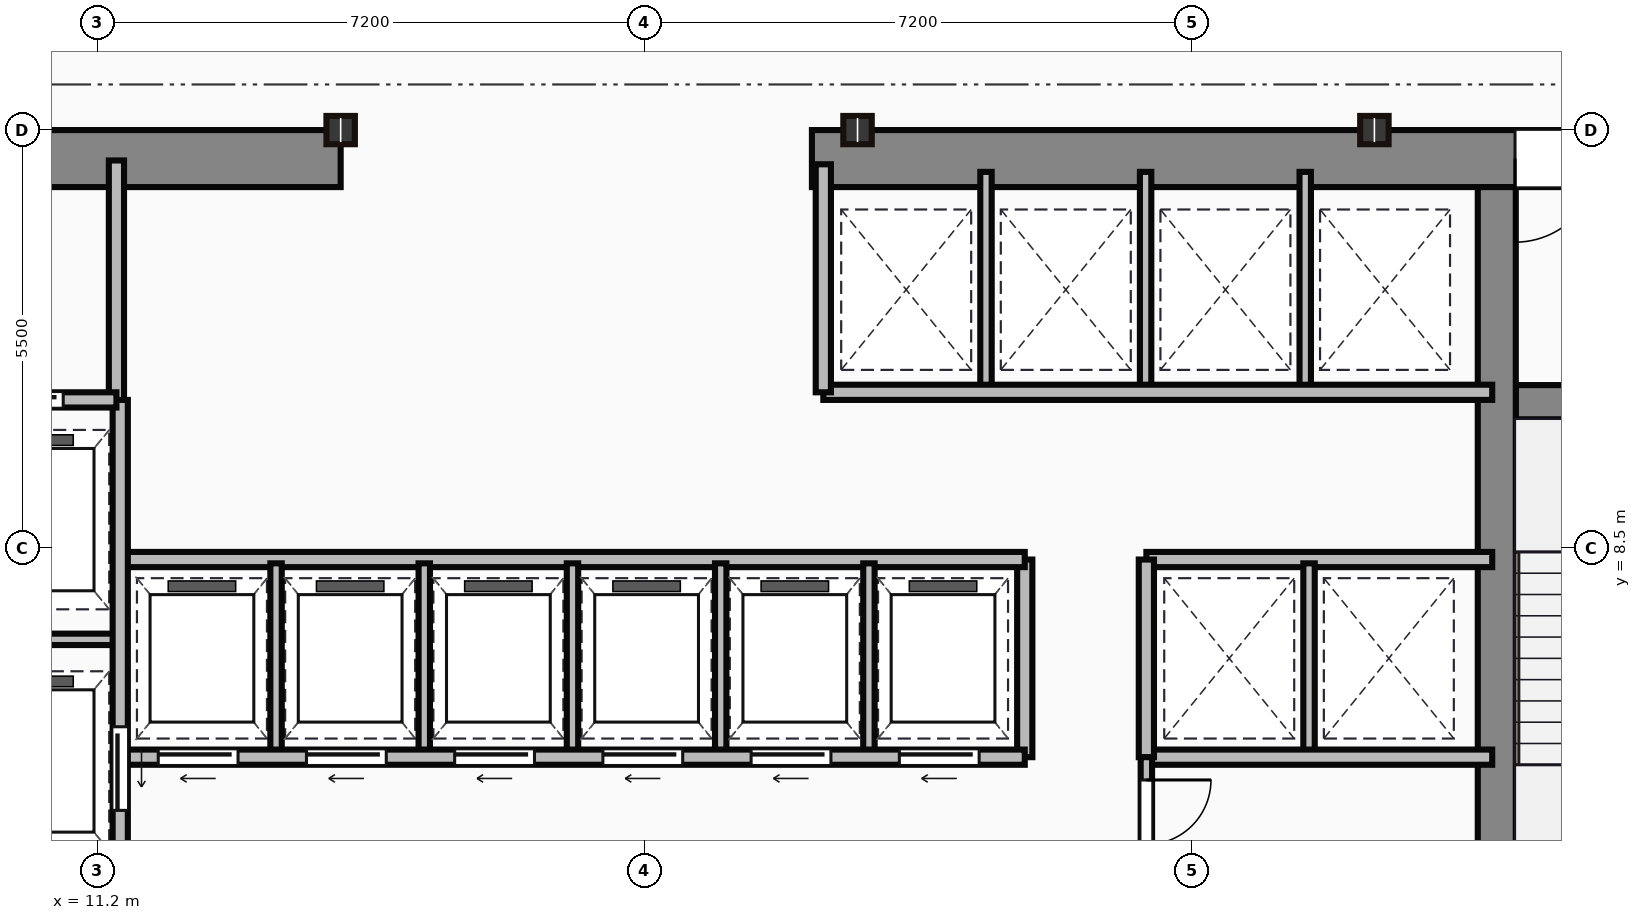
"""IFC4 building model, lengths in metres.
Left out: names, types, materials, properties, quantities, classifications, styles, units other than length and angle.
Written with IfcOpenShell. Run it as: python <this file> out.ifc"""

import sys

from ifc_helpers import new_model, si_unit, direction, frame, frame_2d, origin, origin_2d, place, context, subcontext, project, spatial, rectangle, i_section, extrude, source, transform, mapped, element, fill, save


model = new_model("IFC4")
c1 = context("Model", 3, precision=1e-05, world=origin(), true_north=direction((0.0, 1.0)))
c2 = subcontext(c1, "Body", "Model", "MODEL_VIEW")
j1 = project(units=[si_unit("LENGTHUNIT", "METRE"), si_unit("PLANEANGLEUNIT", "RADIAN")], contexts=[c1])
p1 = place(None, origin())
s1 = spatial("IfcSite", under=j1, at=p1, CompositionType="ELEMENT")
p2 = place(p1, origin())
s2 = spatial("IfcBuilding", under=s1, at=p2, CompositionType="ELEMENT")
p3 = place(p2, frame((0.0, 0.0, 140.6)))
s3 = spatial("IfcBuildingStorey", under=s2, at=p3, CompositionType="ELEMENT", Elevation=140.6)
m1 = source(origin(), c2, "Body", "SweptSolid", [
    extrude(rectangle(XDim=9.1, YDim=0.75, at=frame_2d((4.55, 0.0))), origin(), (0.0, 0.0, 1.0), 3.65),
])
p4 = place(p3, frame((5.3, 13.625, 0.0), z_axis=(0.0, 0.0, 1.0), x_axis=(1.0, 0.0, 0.0)))
e1 = element("IfcWall", 1, at=p4, inside=s3, PredefinedType="SHEAR", context=c2, shape_type="MappedRepresentation", body=[
    mapped(m1, transform((0.0, 0.0, 0.0))),
])
p5 = place(p4, frame((4.1, 0.0, 0.0)))
e2 = element("IfcOpeningElement", 2, at=p5, cuts=e1, PredefinedType="OPENING", context=c2, shape_type="SweptSolid", body=[
    extrude(rectangle(XDim=1.1, YDim=2.15, at=frame_2d((0.55, 1.075))), frame((0.0, 0.385, 0.0), z_axis=(0.0, -1.0, 0.0), x_axis=(1.0, 0.0, 0.0)), (0.0, 0.0, 1.0), 0.77),
])
m2 = source(origin(), c2, "Body", "SweptSolid", [
    extrude(rectangle(XDim=12.6, YDim=0.75, at=frame_2d((6.3, 0.0))), origin(), (0.0, 0.0, 1.0), 3.65),
])
p6 = place(p3, frame((20.6, 13.625, 0.0), z_axis=(0.0, 0.0, 1.0), x_axis=(1.0, 0.0, 0.0)))
e3 = element("IfcWall", 3, at=p6, inside=s3, PredefinedType="SHEAR", context=c2, shape_type="MappedRepresentation", body=[
    mapped(m2, transform((0.0, 0.0, 0.0))),
])
p7 = place(p6, frame((9.25, 0.0, 0.0)))
e4 = element("IfcOpeningElement", 4, at=p7, cuts=e3, PredefinedType="OPENING", context=c2, shape_type="SweptSolid", body=[
    extrude(rectangle(XDim=1.1, YDim=2.15, at=frame_2d((0.55, 1.075))), frame((0.0, 0.385, 0.0), z_axis=(0.0, -1.0, 0.0), x_axis=(1.0, 0.0, 0.0)), (0.0, 0.0, 1.0), 0.77),
])
m3 = source(origin(), c2, "Body", "SweptSolid", [
    extrude(rectangle(XDim=12.35, YDim=0.5, at=frame_2d((6.175, 0.0))), origin(), (0.0, 0.0, 1.0), 3.65),
])
p8 = place(p3, frame((29.61, 0.9, 0.0), z_axis=(0.0, 0.0, 1.0), x_axis=(0.0, 1.0, 0.0)))
e5 = element("IfcWall", 5, at=p8, inside=s3, PredefinedType="SHEAR", context=c2, shape_type="MappedRepresentation", body=[
    mapped(m3, transform((0.0, 0.0, 0.0))),
])
m4 = source(origin(), c2, "Body", "SweptSolid", [
    extrude(rectangle(XDim=3.39, YDim=0.45, at=frame_2d((1.695, 0.0))), origin(), (0.0, 0.0, 1.0), 3.65),
])
p9 = place(p3, frame((29.86, 10.42, 0.0), z_axis=(0.0, 0.0, 1.0), x_axis=(1.0, 0.0, 0.0)))
e6 = element("IfcWall", 6, at=p9, inside=s3, PredefinedType="SHEAR", context=c2, shape_type="MappedRepresentation", body=[
    mapped(m4, transform((0.0, 0.0, 0.0))),
])
p10 = place(p9, frame((1.1, 0.0, 0.0)))
e7 = element("IfcOpeningElement", 7, at=p10, cuts=e6, PredefinedType="OPENING", context=c2, shape_type="SweptSolid", body=[
    extrude(rectangle(XDim=1.1, YDim=2.15, at=frame_2d((0.55, 1.075))), frame((0.0, 0.235, 0.0), z_axis=(0.0, -1.0, 0.0), x_axis=(1.0, 0.0, 0.0)), (0.0, 0.0, 1.0), 0.47),
])
m5 = source(origin(), c2, "Body", "SweptSolid", [
    extrude(i_section(OverallWidth=0.374, OverallDepth=0.372, WebThickness=0.016, FlangeThickness=0.026, at=origin_2d()), origin(), (0.0, 0.0, 1.0), 3.65),
])
for number, where, z_axis, x_axis in (
    (8, (14.4, 14.0, 0.0), (0.0, 0.0, 1.0), (1.0, 0.0, 0.0)),
    (9, (21.2, 14.0, 0.0), (0.0, 0.0, 1.0), (1.0, 0.0, 0.0)),
    (10, (28.0, 14.0, 0.0), (0.0, 0.0, 1.0), (1.0, 0.0, 0.0)),
):
    element("IfcColumn", number, at=place(p3, frame(where, z_axis=z_axis, x_axis=x_axis)), inside=s3, PredefinedType="COLUMN", context=c2, shape_type="MappedRepresentation", body=[
        mapped(m5, transform((0.0, 0.0, 0.0))),
    ])
m6 = source(origin(), c2, "Body", "SweptSolid", [
    extrude(rectangle(XDim=3.18, YDim=0.2, at=frame_2d((1.59, 0.0))), origin(), (0.0, 0.0, 1.0), 3.4),
])
p11 = place(p3, frame((11.45, 10.42, 0.0), z_axis=(0.0, 0.0, 1.0), x_axis=(0.0, 1.0, 0.0)))
e11 = element("IfcWall", 11, at=p11, inside=s3, PredefinedType="PARTITIONING", context=c2, shape_type="MappedRepresentation", body=[
    mapped(m6, transform((0.0, 0.0, 0.0))),
])
m7 = source(origin(), c2, "Body", "SweptSolid", [
    extrude(rectangle(XDim=2.35, YDim=0.2, at=frame_2d((1.175, 0.0))), origin(), (0.0, 0.0, 1.0), 3.4),
])
p12 = place(p3, frame((9.1, 10.45, 0.0), z_axis=(0.0, 0.0, 1.0), x_axis=(1.0, 0.0, 0.0)))
e12 = element("IfcWall", 12, at=p12, inside=s3, PredefinedType="PARTITIONING", context=c2, shape_type="MappedRepresentation", body=[
    mapped(m7, transform((0.0, 0.0, 0.0))),
])
p13 = place(p12, frame((0.55, 0.0, 0.0)))
e13 = element("IfcOpeningElement", 13, at=p13, cuts=e12, PredefinedType="OPENING", context=c2, shape_type="SweptSolid", body=[
    extrude(rectangle(XDim=1.1, YDim=2.15, at=frame_2d((0.55, 1.075))), frame((0.0, 0.11, 0.0), z_axis=(0.0, -1.0, 0.0), x_axis=(1.0, 0.0, 0.0)), (0.0, 0.0, 1.0), 0.22),
])
m8 = source(origin(), c2, "Body", "SweptSolid", [
    extrude(rectangle(XDim=9.6, YDim=0.2, at=frame_2d((4.8, 0.0))), origin(), (0.0, 0.0, 1.0), 3.4),
])
p14 = place(p3, frame((11.5, 0.85, 0.0), z_axis=(0.0, 0.0, 1.0), x_axis=(0.0, 1.0, 0.0)))
e14 = element("IfcWall", 14, at=p14, inside=s3, PredefinedType="PARTITIONING", context=c2, shape_type="MappedRepresentation", body=[
    mapped(m8, transform((0.0, 0.0, 0.0))),
])
p15 = place(p14, frame((4.2, 0.0, 0.0)))
e15 = element("IfcOpeningElement", 15, at=p15, cuts=e14, PredefinedType="OPENING", context=c2, shape_type="SweptSolid", body=[
    extrude(rectangle(XDim=1.1, YDim=2.15, at=frame_2d((0.55, 1.075))), frame((0.0, 0.11, 0.0), z_axis=(0.0, -1.0, 0.0), x_axis=(1.0, 0.0, 0.0)), (0.0, 0.0, 1.0), 0.22),
])
p16 = place(p14, frame((0.9, 0.0, 0.0)))
e16 = element("IfcOpeningElement", 16, at=p16, cuts=e14, PredefinedType="OPENING", context=c2, shape_type="SweptSolid", body=[
    extrude(rectangle(XDim=1.2, YDim=2.15, at=frame_2d((0.6, 1.075))), frame((0.0, 0.11, 0.0), z_axis=(0.0, -1.0, 0.0), x_axis=(1.0, 0.0, 0.0)), (0.0, 0.0, 1.0), 0.22),
])
m9 = source(origin(), c2, "Body", "SweptSolid", [
    extrude(rectangle(XDim=2.4, YDim=0.15, at=frame_2d((1.2, 0.0))), origin(), (0.0, 0.0, 1.0), 3.4),
])
p17 = place(p3, frame((9.1, 7.3, 0.0), z_axis=(0.0, 0.0, 1.0), x_axis=(1.0, 0.0, 0.0)))
e17 = element("IfcWall", 17, at=p17, inside=s3, PredefinedType="PARTITIONING", context=c2, shape_type="MappedRepresentation", body=[
    mapped(m9, transform((0.0, 0.0, 0.0))),
])
m10 = source(origin(), c2, "Body", "SweptSolid", [
    extrude(rectangle(XDim=11.85, YDim=0.2, at=frame_2d((5.925, 0.0))), origin(), (0.0, 0.0, 1.0), 3.4),
])
p18 = place(p3, frame((11.55, 5.75, 0.0), z_axis=(0.0, 0.0, 1.0), x_axis=(1.0, 0.0, 0.0)))
e18 = element("IfcWall", 18, at=p18, inside=s3, PredefinedType="PARTITIONING", context=c2, shape_type="MappedRepresentation", body=[
    mapped(m10, transform((0.0, 0.0, 0.0))),
])
p19 = place(p18, frame((0.45, 0.0, 0.0)))
e19 = element("IfcOpeningElement", 19, at=p19, cuts=e18, PredefinedType="OPENING", context=c2, shape_type="SweptSolid", body=[
    extrude(rectangle(XDim=1.05, YDim=2.15, at=frame_2d((0.525, 1.075))), frame((0.0, 0.11, 0.0), z_axis=(0.0, -1.0, 0.0), x_axis=(1.0, 0.0, 0.0)), (0.0, 0.0, 1.0), 0.22),
])
p20 = place(p18, frame((2.4, 0.0, 0.0)))
e20 = element("IfcOpeningElement", 20, at=p20, cuts=e18, PredefinedType="OPENING", context=c2, shape_type="SweptSolid", body=[
    extrude(rectangle(XDim=1.05, YDim=2.15, at=frame_2d((0.525, 1.075))), frame((0.0, 0.11, 0.0), z_axis=(0.0, -1.0, 0.0), x_axis=(1.0, 0.0, 0.0)), (0.0, 0.0, 1.0), 0.22),
])
p21 = place(p18, frame((4.35, 0.0, 0.0)))
e21 = element("IfcOpeningElement", 21, at=p21, cuts=e18, PredefinedType="OPENING", context=c2, shape_type="SweptSolid", body=[
    extrude(rectangle(XDim=1.05, YDim=2.15, at=frame_2d((0.525, 1.075))), frame((0.0, 0.11, 0.0), z_axis=(0.0, -1.0, 0.0), x_axis=(1.0, 0.0, 0.0)), (0.0, 0.0, 1.0), 0.22),
])
p22 = place(p18, frame((6.3, 0.0, 0.0)))
e22 = element("IfcOpeningElement", 22, at=p22, cuts=e18, PredefinedType="OPENING", context=c2, shape_type="SweptSolid", body=[
    extrude(rectangle(XDim=1.05, YDim=2.15, at=frame_2d((0.525, 1.075))), frame((0.0, 0.11, 0.0), z_axis=(0.0, -1.0, 0.0), x_axis=(1.0, 0.0, 0.0)), (0.0, 0.0, 1.0), 0.22),
])
p23 = place(p18, frame((8.25, 0.0, 0.0)))
e23 = element("IfcOpeningElement", 23, at=p23, cuts=e18, PredefinedType="OPENING", context=c2, shape_type="SweptSolid", body=[
    extrude(rectangle(XDim=1.05, YDim=2.15, at=frame_2d((0.525, 1.075))), frame((0.0, 0.11, 0.0), z_axis=(0.0, -1.0, 0.0), x_axis=(1.0, 0.0, 0.0)), (0.0, 0.0, 1.0), 0.22),
])
p24 = place(p18, frame((10.2, 0.0, 0.0)))
e24 = element("IfcOpeningElement", 24, at=p24, cuts=e18, PredefinedType="OPENING", context=c2, shape_type="SweptSolid", body=[
    extrude(rectangle(XDim=1.05, YDim=2.15, at=frame_2d((0.525, 1.075))), frame((0.0, 0.11, 0.0), z_axis=(0.0, -1.0, 0.0), x_axis=(1.0, 0.0, 0.0)), (0.0, 0.0, 1.0), 0.22),
])
p25 = place(p3, frame((11.55, 8.35, 0.0), z_axis=(0.0, 0.0, 1.0), x_axis=(1.0, 0.0, 0.0)))
e25 = element("IfcWall", 25, at=p25, inside=s3, PredefinedType="PARTITIONING", context=c2, shape_type="MappedRepresentation", body=[
    mapped(m10, transform((0.0, 0.0, 0.0))),
])
m11 = source(origin(), c2, "Body", "SweptSolid", [
    extrude(rectangle(XDim=2.6, YDim=0.2, at=frame_2d((1.3, 0.0))), origin(), (0.0, 0.0, 1.0), 3.4),
])
p26 = place(p3, frame((23.4, 5.75, 0.0), z_axis=(0.0, 0.0, 1.0), x_axis=(0.0, 1.0, 0.0)))
e26 = element("IfcWall", 26, at=p26, inside=s3, PredefinedType="PARTITIONING", context=c2, shape_type="MappedRepresentation", body=[
    mapped(m11, transform((0.0, 0.0, 0.0))),
])
m12 = source(origin(), c2, "Body", "SweptSolid", [
    extrude(rectangle(XDim=2.5, YDim=0.15, at=frame_2d((1.25, 0.0))), origin(), (0.0, 0.0, 1.0), 3.4),
])
for number, where, z_axis, x_axis in (
    (27, (13.55, 5.8, 0.0), (0.0, 0.0, 1.0), (0.0, 1.0, 0.0)),
    (28, (15.5, 5.8, 0.0), (0.0, 0.0, 1.0), (0.0, 1.0, 0.0)),
    (29, (17.45, 5.8, 0.0), (0.0, 0.0, 1.0), (0.0, 1.0, 0.0)),
    (30, (19.4, 5.8, 0.0), (0.0, 0.0, 1.0), (0.0, 1.0, 0.0)),
    (31, (21.35, 5.8, 0.0), (0.0, 0.0, 1.0), (0.0, 1.0, 0.0)),
):
    element("IfcWall", number, at=place(p3, frame(where, z_axis=z_axis, x_axis=x_axis)), inside=s3, PredefinedType="PARTITIONING", context=c2, shape_type="MappedRepresentation", body=[
        mapped(m12, transform((0.0, 0.0, 0.0))),
    ])
m13 = source(origin(), c2, "Body", "SweptSolid", [
    extrude(rectangle(XDim=8.8, YDim=0.2, at=frame_2d((4.4, 0.0))), origin(), (0.0, 0.0, 1.0), 3.4),
])
p27 = place(p3, frame((20.75, 10.55, 0.0), z_axis=(0.0, 0.0, 1.0), x_axis=(1.0, 0.0, 0.0)))
e32 = element("IfcWall", 32, at=p27, inside=s3, PredefinedType="PARTITIONING", context=c2, shape_type="MappedRepresentation", body=[
    mapped(m13, transform((0.0, 0.0, 0.0))),
])
m14 = source(origin(), c2, "Body", "SweptSolid", [
    extrude(rectangle(XDim=3.0, YDim=0.2, at=frame_2d((1.5, 0.0))), origin(), (0.0, 0.0, 1.0), 3.4),
])
p28 = place(p3, frame((20.75, 10.55, 0.0), z_axis=(0.0, 0.0, 1.0), x_axis=(0.0, 1.0, 0.0)))
e33 = element("IfcWall", 33, at=p28, inside=s3, PredefinedType="PARTITIONING", context=c2, shape_type="MappedRepresentation", body=[
    mapped(m14, transform((0.0, 0.0, 0.0))),
])
m15 = source(origin(), c2, "Body", "SweptSolid", [
    extrude(rectangle(XDim=2.85, YDim=0.15, at=frame_2d((1.425, 0.0))), origin(), (0.0, 0.0, 1.0), 3.4),
])
for number, where, z_axis, x_axis in (
    (34, (22.89, 10.6, 0.0), (0.0, 0.0, 1.0), (0.0, 1.0, 0.0)),
    (35, (24.99, 10.6, 0.0), (0.0, 0.0, 1.0), (0.0, 1.0, 0.0)),
    (36, (27.09, 10.6, 0.0), (0.0, 0.0, 1.0), (0.0, 1.0, 0.0)),
):
    element("IfcWall", number, at=place(p3, frame(where, z_axis=z_axis, x_axis=x_axis)), inside=s3, PredefinedType="PARTITIONING", context=c2, shape_type="MappedRepresentation", body=[
        mapped(m15, transform((0.0, 0.0, 0.0))),
    ])
m16 = source(origin(), c2, "Body", "SweptSolid", [
    extrude(rectangle(XDim=4.55, YDim=0.2, at=frame_2d((2.275, 0.0))), origin(), (0.0, 0.0, 1.0), 3.4),
])
for number, where, z_axis, x_axis in (
    (37, (25.0, 8.35, 0.0), (0.0, 0.0, 1.0), (1.0, 0.0, 0.0)),
    (38, (25.0, 5.75, 0.0), (0.0, 0.0, 1.0), (1.0, 0.0, 0.0)),
):
    element("IfcWall", number, at=place(p3, frame(where, z_axis=z_axis, x_axis=x_axis)), inside=s3, PredefinedType="PARTITIONING", context=c2, shape_type="MappedRepresentation", body=[
        mapped(m16, transform((0.0, 0.0, 0.0))),
    ])
p29 = place(p3, frame((25.0, 5.75, 0.0), z_axis=(0.0, 0.0, 1.0), x_axis=(0.0, 1.0, 0.0)))
e39 = element("IfcWall", 39, at=p29, inside=s3, PredefinedType="PARTITIONING", context=c2, shape_type="MappedRepresentation", body=[
    mapped(m11, transform((0.0, 0.0, 0.0))),
])
p30 = place(p3, frame((27.14, 5.8, 0.0), z_axis=(0.0, 0.0, 1.0), x_axis=(0.0, 1.0, 0.0)))
e40 = element("IfcWall", 40, at=p30, inside=s3, PredefinedType="PARTITIONING", context=c2, shape_type="MappedRepresentation", body=[
    mapped(m12, transform((0.0, 0.0, 0.0))),
])
m17 = source(origin(), c2, "Body", "SweptSolid", [
    extrude(rectangle(XDim=4.9, YDim=0.15, at=frame_2d((2.45, 0.0))), origin(), (0.0, 0.0, 1.0), 3.4),
])
p31 = place(p3, frame((25.0, 0.85, 0.0), z_axis=(0.0, 0.0, 1.0), x_axis=(0.0, 1.0, 0.0)))
e41 = element("IfcWall", 41, at=p31, inside=s3, PredefinedType="PARTITIONING", context=c2, shape_type="MappedRepresentation", body=[
    mapped(m17, transform((0.0, 0.0, 0.0))),
])
p32 = place(p31, frame((2.0, 0.0, 0.0)))
e42 = element("IfcOpeningElement", 42, at=p32, cuts=e41, PredefinedType="OPENING", context=c2, shape_type="SweptSolid", body=[
    extrude(rectangle(XDim=0.95, YDim=2.15, at=frame_2d((0.475, 1.075))), frame((0.0, 0.085, 0.0), z_axis=(0.0, -1.0, 0.0), x_axis=(1.0, 0.0, 0.0)), (0.0, 0.0, 1.0), 0.17),
])
p33 = place(p31, frame((3.75, 0.0, 0.0)))
e43 = element("IfcOpeningElement", 43, at=p33, cuts=e41, PredefinedType="OPENING", context=c2, shape_type="SweptSolid", body=[
    extrude(rectangle(XDim=0.85, YDim=2.15, at=frame_2d((0.425, 1.075))), frame((0.0, 0.085, 0.0), z_axis=(0.0, -1.0, 0.0), x_axis=(1.0, 0.0, 0.0)), (0.0, 0.0, 1.0), 0.17),
])
m18 = source(origin(), c2, "Body", "SweptSolid", [
    extrude(rectangle(XDim=1.1, YDim=2.15, at=frame_2d((0.55, 1.075))), frame((0.0, 0.025, 0.0), z_axis=(0.0, -1.0, 0.0), x_axis=(1.0, 0.0, 0.0)), (0.0, 0.0, 1.0), 0.05),
])
p34 = place(p7, origin())
e44 = element("IfcDoor", 44, at=p34, inside=s3, OperationType="SINGLE_SWING_LEFT", PredefinedType="DOOR", context=c2, shape_type="MappedRepresentation", body=[
    mapped(m18, transform((0.0, 0.0, 0.0))),
])
fill(e4, e44)
p35 = place(p13, origin())
e45 = element("IfcDoor", 45, at=p35, inside=s3, OperationType="SLIDING_TO_LEFT", PredefinedType="DOOR", context=c2, shape_type="MappedRepresentation", body=[
    mapped(m18, transform((0.0, 0.0, 0.0))),
])
fill(e13, e45)
p36 = place(p15, frame((1.1, 0.0, 0.0), z_axis=(0.0, 0.0, 1.0), x_axis=(-1.0, 0.0, 0.0)))
e46 = element("IfcDoor", 46, at=p36, inside=s3, OperationType="SLIDING_TO_LEFT", PredefinedType="DOOR", context=c2, shape_type="MappedRepresentation", body=[
    mapped(m18, transform((0.0, 0.0, 0.0))),
])
fill(e15, e46)
m19 = source(origin(), c2, "Body", "SweptSolid", [
    extrude(rectangle(XDim=1.05, YDim=2.15, at=frame_2d((0.525, 1.075))), frame((0.0, 0.025, 0.0), z_axis=(0.0, -1.0, 0.0), x_axis=(1.0, 0.0, 0.0)), (0.0, 0.0, 1.0), 0.05),
])
p37 = place(p19, frame((1.05, 0.0, 0.0), z_axis=(0.0, 0.0, 1.0), x_axis=(-1.0, 0.0, 0.0)))
e47 = element("IfcDoor", 47, at=p37, inside=s3, OperationType="SLIDING_TO_LEFT", PredefinedType="DOOR", context=c2, shape_type="MappedRepresentation", body=[
    mapped(m19, transform((0.0, 0.0, 0.0))),
])
fill(e19, e47)
p38 = place(p20, frame((1.05, 0.0, 0.0), z_axis=(0.0, 0.0, 1.0), x_axis=(-1.0, 0.0, 0.0)))
e48 = element("IfcDoor", 48, at=p38, inside=s3, OperationType="SLIDING_TO_LEFT", PredefinedType="DOOR", context=c2, shape_type="MappedRepresentation", body=[
    mapped(m19, transform((0.0, 0.0, 0.0))),
])
fill(e20, e48)
p39 = place(p21, frame((1.05, 0.0, 0.0), z_axis=(0.0, 0.0, 1.0), x_axis=(-1.0, 0.0, 0.0)))
e49 = element("IfcDoor", 49, at=p39, inside=s3, OperationType="SLIDING_TO_LEFT", PredefinedType="DOOR", context=c2, shape_type="MappedRepresentation", body=[
    mapped(m19, transform((0.0, 0.0, 0.0))),
])
fill(e21, e49)
p40 = place(p22, frame((1.05, 0.0, 0.0), z_axis=(0.0, 0.0, 1.0), x_axis=(-1.0, 0.0, 0.0)))
e50 = element("IfcDoor", 50, at=p40, inside=s3, OperationType="SLIDING_TO_LEFT", PredefinedType="DOOR", context=c2, shape_type="MappedRepresentation", body=[
    mapped(m19, transform((0.0, 0.0, 0.0))),
])
fill(e22, e50)
p41 = place(p23, frame((1.05, 0.0, 0.0), z_axis=(0.0, 0.0, 1.0), x_axis=(-1.0, 0.0, 0.0)))
e51 = element("IfcDoor", 51, at=p41, inside=s3, OperationType="SLIDING_TO_LEFT", PredefinedType="DOOR", context=c2, shape_type="MappedRepresentation", body=[
    mapped(m19, transform((0.0, 0.0, 0.0))),
])
fill(e23, e51)
p42 = place(p24, frame((1.05, 0.0, 0.0), z_axis=(0.0, 0.0, 1.0), x_axis=(-1.0, 0.0, 0.0)))
e52 = element("IfcDoor", 52, at=p42, inside=s3, OperationType="SLIDING_TO_LEFT", PredefinedType="DOOR", context=c2, shape_type="MappedRepresentation", body=[
    mapped(m19, transform((0.0, 0.0, 0.0))),
])
fill(e24, e52)
m20 = source(origin(), c2, "Body", "SweptSolid", [
    extrude(rectangle(XDim=0.85, YDim=2.15, at=frame_2d((0.425, 1.075))), frame((0.0, 0.025, 0.0), z_axis=(0.0, -1.0, 0.0), x_axis=(1.0, 0.0, 0.0)), (0.0, 0.0, 1.0), 0.05),
])
p43 = place(p33, origin())
e53 = element("IfcDoor", 53, at=p43, inside=s3, OperationType="SINGLE_SWING_RIGHT", PredefinedType="DOOR", context=c2, shape_type="MappedRepresentation", body=[
    mapped(m20, transform((0.0, 0.0, 0.0))),
])
fill(e43, e53)
save(model, sys.argv[1])
